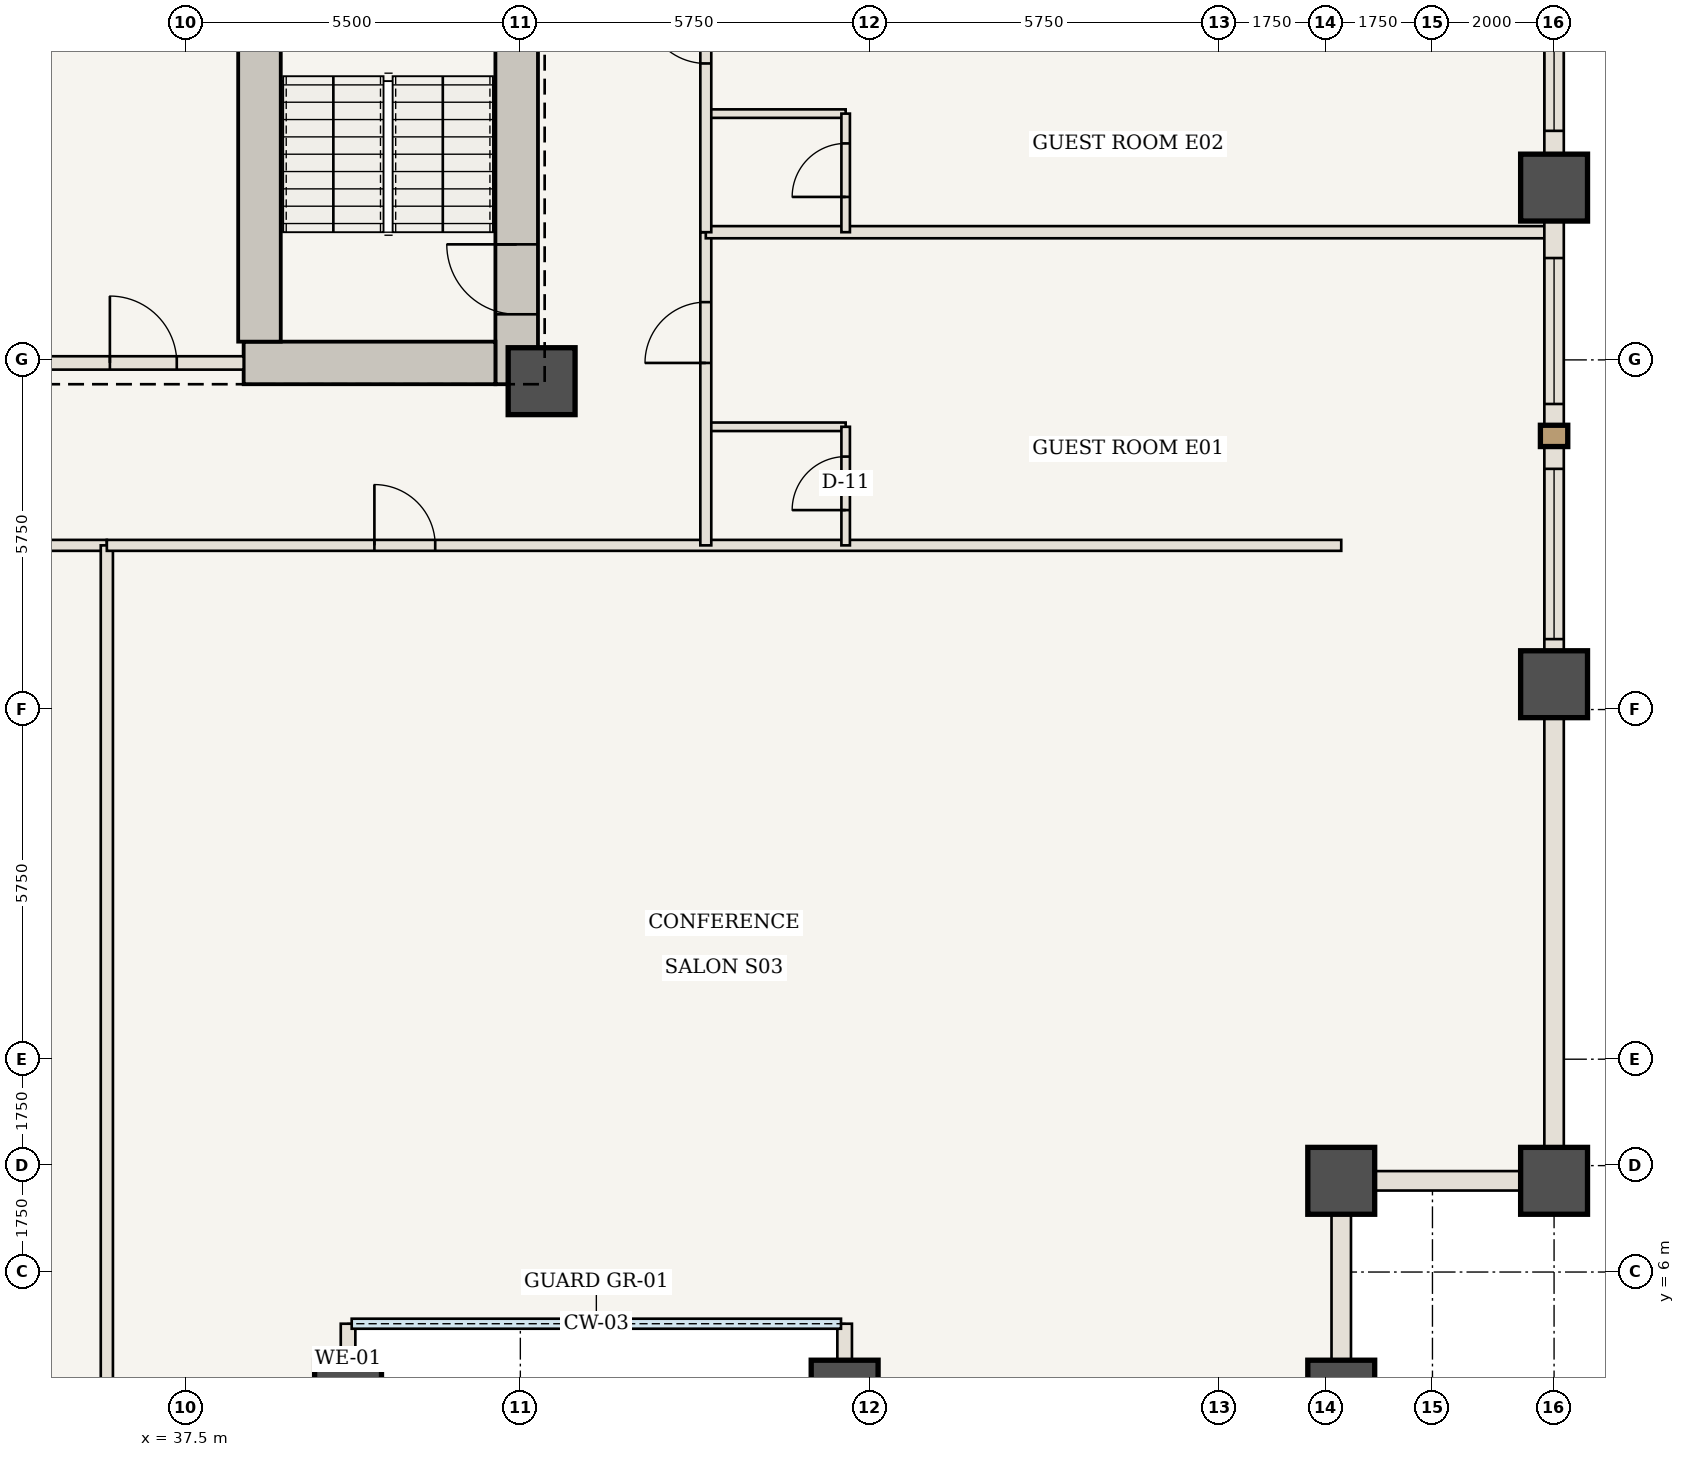
"""IFC4 building model, lengths in metres.
Left out: names, types, materials, properties, quantities, classifications, styles, units other than length and angle.
Written with IfcOpenShell. Run it as: python <this file> out.ifc"""

import sys

from ifc_helpers import new_model, si_unit, direction, frame, frame_2d, origin, origin_2d, place, context, subcontext, project, spatial, rectangle, extrude, element, fill, save


model = new_model("IFC4")
c1 = context("Model", 3, precision=1e-05, world=origin(), true_north=direction((0.0, 1.0)))
c2 = subcontext(c1, "Body", "Model", "MODEL_VIEW")
j1 = project(units=[si_unit("LENGTHUNIT", "METRE"), si_unit("PLANEANGLEUNIT", "RADIAN")], contexts=[c1])
p1 = place(None, origin())
s1 = spatial("IfcSite", under=j1, at=p1, CompositionType="ELEMENT")
p2 = place(p1, origin())
s2 = spatial("IfcBuilding", under=s1, at=p2, CompositionType="ELEMENT")
p3 = place(p2, frame((0.0, 0.0, 66.85)))
s3 = spatial("IfcBuildingStorey", under=s2, at=p3, CompositionType="ELEMENT", Elevation=66.85)
p4 = place(p3, frame((42.94, 20.6, 0.0), z_axis=(0.0, 0.0, 1.0), x_axis=(0.0, 1.0, 0.0)))
e1 = element("IfcWall", 1, at=p4, inside=s3, PredefinedType="SHEAR", context=c2, shape_type="SweptSolid", body=[
    extrude(rectangle(XDim=10.0, YDim=0.7, at=frame_2d((5.0, 0.0))), origin(), (0.0, 0.0, 1.0), 3.5),
])
p5 = place(p4, frame((1.15, 0.0, 0.0)))
e2 = element("IfcOpeningElement", 2, at=p5, cuts=e1, PredefinedType="OPENING", context=c2, shape_type="SweptSolid", body=[
    extrude(rectangle(XDim=1.15, YDim=2.15, at=frame_2d((0.575, 1.075))), frame((0.0, 0.36, 0.0), z_axis=(0.0, -1.0, 0.0), x_axis=(1.0, 0.0, 0.0)), (0.0, 0.0, 1.0), 0.72),
])
p6 = place(p3, frame((38.45, 20.95, 0.0), z_axis=(0.0, 0.0, 1.0), x_axis=(1.0, 0.0, 0.0)))
e3 = element("IfcWall", 3, at=p6, inside=s3, PredefinedType="SHEAR", context=c2, shape_type="SweptSolid", body=[
    extrude(rectangle(XDim=4.14, YDim=0.7, at=frame_2d((2.07, 0.0))), origin(), (0.0, 0.0, 1.0), 3.5),
])
p7 = place(p3, frame((38.71, 21.3, 0.0), z_axis=(0.0, 0.0, 1.0), x_axis=(0.0, 1.0, 0.0)))
e4 = element("IfcWall", 4, at=p7, inside=s3, PredefinedType="SHEAR", context=c2, shape_type="SweptSolid", body=[
    extrude(rectangle(XDim=9.3, YDim=0.7, at=frame_2d((4.65, 0.0))), origin(), (0.0, 0.0, 1.0), 3.5),
])
for number, where, z_axis, x_axis in (
    (5, (43.35, 20.65, 0.0), (0.0, 0.0, 1.0), (1.0, 0.0, 0.0)),
    (6, (56.5, 4.0, 0.0), (0.0, 0.0, 1.0), (1.0, 0.0, 0.0)),
    (7, (56.5, 7.5, 0.0), (0.0, 0.0, 1.0), (1.0, 0.0, 0.0)),
    (8, (60.0, 7.5, 0.0), (0.0, 0.0, 1.0), (1.0, 0.0, 0.0)),
    (9, (60.0, 15.667, 0.0), (0.0, 0.0, 1.0), (1.0, 0.0, 0.0)),
    (10, (60.0, 23.833, 0.0), (0.0, 0.0, 1.0), (1.0, 0.0, 0.0)),
    (11, (40.167, 4.0, 0.0), (0.0, 0.0, 1.0), (1.0, 0.0, 0.0)),
    (12, (48.333, 4.0, 0.0), (0.0, 0.0, 1.0), (1.0, 0.0, 0.0)),
):
    element("IfcColumn", number, at=place(p3, frame(where, z_axis=z_axis, x_axis=x_axis)), inside=s3, PredefinedType="COLUMN", context=c2, shape_type="SweptSolid", body=[
        extrude(rectangle(XDim=1.1, YDim=1.1, at=origin_2d()), origin(), (0.0, 0.0, 1.0), 3.5),
    ])
p8 = place(p3, frame((35.15, 20.95, 0.0), z_axis=(0.0, 0.0, 1.0), x_axis=(1.0, 0.0, 0.0)))
e13 = element("IfcWall", 13, at=p8, inside=s3, PredefinedType="STANDARD", context=c2, shape_type="SweptSolid", body=[
    extrude(rectangle(XDim=3.3, YDim=0.22, at=frame_2d((1.65, 0.0))), origin(), (0.0, 0.0, 1.0), 3.32),
])
p9 = place(p8, frame((1.1, 0.0, 0.0)))
e14 = element("IfcOpeningElement", 14, at=p9, cuts=e13, PredefinedType="OPENING", context=c2, shape_type="SweptSolid", body=[
    extrude(rectangle(XDim=1.1, YDim=2.15, at=frame_2d((0.55, 1.075))), frame((0.0, 0.12, 0.0), z_axis=(0.0, -1.0, 0.0), x_axis=(1.0, 0.0, 0.0)), (0.0, 0.0, 1.0), 0.24),
])
p10 = place(p3, frame((21.8, 17.95, 0.0), z_axis=(0.0, 0.0, 1.0), x_axis=(1.0, 0.0, 0.0)))
e15 = element("IfcWall", 15, at=p10, inside=s3, PredefinedType="STANDARD", context=c2, shape_type="SweptSolid", body=[
    extrude(rectangle(XDim=14.4, YDim=0.18, at=frame_2d((7.2, 0.0))), origin(), (0.0, 0.0, 1.0), 3.32),
])
p11 = place(p10, frame((8.15, 0.0, 0.0)))
e16 = element("IfcOpeningElement", 16, at=p11, cuts=e15, PredefinedType="OPENING", context=c2, shape_type="SweptSolid", body=[
    extrude(rectangle(XDim=1.0, YDim=2.15, at=frame_2d((0.5, 1.075))), frame((0.0, 0.1, 0.0), z_axis=(0.0, -1.0, 0.0), x_axis=(1.0, 0.0, 0.0)), (0.0, 0.0, 1.0), 0.2),
])
p12 = place(p3, frame((36.2, 4.06, 0.0), z_axis=(0.0, 0.0, 1.0), x_axis=(0.0, 1.0, 0.0)))
e17 = element("IfcWall", 17, at=p12, inside=s3, PredefinedType="STANDARD", context=c2, shape_type="SweptSolid", body=[
    extrude(rectangle(XDim=13.89, YDim=0.2, at=frame_2d((6.945, 0.0))), origin(), (0.0, 0.0, 1.0), 3.32),
])
p13 = place(p3, frame((36.2, 17.95, 0.0), z_axis=(0.0, 0.0, 1.0), x_axis=(1.0, 0.0, 0.0)))
e18 = element("IfcWall", 18, at=p13, inside=s3, PredefinedType="STANDARD", context=c2, shape_type="SweptSolid", body=[
    extrude(rectangle(XDim=20.3, YDim=0.18, at=frame_2d((10.15, 0.0))), origin(), (0.0, 0.0, 1.0), 3.32),
])
p14 = place(p13, frame((4.4, 0.0, 0.0)))
e19 = element("IfcOpeningElement", 19, at=p14, cuts=e18, PredefinedType="OPENING", context=c2, shape_type="SweptSolid", body=[
    extrude(rectangle(XDim=1.0, YDim=2.15, at=frame_2d((0.5, 1.075))), frame((0.0, 0.1, 0.0), z_axis=(0.0, -1.0, 0.0), x_axis=(1.0, 0.0, 0.0)), (0.0, 0.0, 1.0), 0.2),
])
p15 = place(p3, frame((46.05, 19.9, 0.0), z_axis=(0.0, 0.0, 1.0), x_axis=(1.0, 0.0, 0.0)))
e20 = element("IfcWall", 20, at=p15, inside=s3, PredefinedType="STANDARD", context=c2, shape_type="SweptSolid", body=[
    extrude(rectangle(XDim=2.3, YDim=0.14, at=frame_2d((1.15, 0.0))), origin(), (0.0, 0.0, 1.0), 3.32),
])
p16 = place(p3, frame((48.35, 17.95, 0.0), z_axis=(0.0, 0.0, 1.0), x_axis=(0.0, 1.0, 0.0)))
e21 = element("IfcWall", 21, at=p16, inside=s3, PredefinedType="STANDARD", context=c2, shape_type="SweptSolid", body=[
    extrude(rectangle(XDim=1.95, YDim=0.14, at=frame_2d((0.975, 0.0))), origin(), (0.0, 0.0, 1.0), 3.32),
])
p17 = place(p16, frame((0.58, 0.0, 0.0)))
e22 = element("IfcOpeningElement", 22, at=p17, cuts=e21, PredefinedType="OPENING", context=c2, shape_type="SweptSolid", body=[
    extrude(rectangle(XDim=0.88, YDim=2.1, at=frame_2d((0.44, 1.05))), frame((0.0, 0.08, 0.0), z_axis=(0.0, -1.0, 0.0), x_axis=(1.0, 0.0, 0.0)), (0.0, 0.0, 1.0), 0.16),
])
p18 = place(p3, frame((46.05, 17.95, 0.0), z_axis=(0.0, 0.0, 1.0), x_axis=(0.0, 1.0, 0.0)))
e23 = element("IfcWall", 23, at=p18, inside=s3, PredefinedType="STANDARD", context=c2, shape_type="SweptSolid", body=[
    extrude(rectangle(XDim=5.15, YDim=0.18, at=frame_2d((2.575, 0.0))), origin(), (0.0, 0.0, 1.0), 3.32),
])
p19 = place(p18, frame((3.0, 0.0, 0.0)))
e24 = element("IfcOpeningElement", 24, at=p19, cuts=e23, PredefinedType="OPENING", context=c2, shape_type="SweptSolid", body=[
    extrude(rectangle(XDim=1.0, YDim=2.15, at=frame_2d((0.5, 1.075))), frame((0.0, 0.1, 0.0), z_axis=(0.0, -1.0, 0.0), x_axis=(1.0, 0.0, 0.0)), (0.0, 0.0, 1.0), 0.2),
])
p20 = place(p3, frame((46.05, 23.1, 0.0), z_axis=(0.0, 0.0, 1.0), x_axis=(1.0, 0.0, 0.0)))
e25 = element("IfcWall", 25, at=p20, inside=s3, PredefinedType="STANDARD", context=c2, shape_type="SweptSolid", body=[
    extrude(rectangle(XDim=13.89, YDim=0.2, at=frame_2d((6.945, 0.0))), origin(), (0.0, 0.0, 1.0), 3.32),
])
p21 = place(p3, frame((46.05, 25.05, 0.0), z_axis=(0.0, 0.0, 1.0), x_axis=(1.0, 0.0, 0.0)))
e26 = element("IfcWall", 26, at=p21, inside=s3, PredefinedType="STANDARD", context=c2, shape_type="SweptSolid", body=[
    extrude(rectangle(XDim=2.3, YDim=0.14, at=frame_2d((1.15, 0.0))), origin(), (0.0, 0.0, 1.0), 3.32),
])
p22 = place(p3, frame((48.35, 23.1, 0.0), z_axis=(0.0, 0.0, 1.0), x_axis=(0.0, 1.0, 0.0)))
e27 = element("IfcWall", 27, at=p22, inside=s3, PredefinedType="STANDARD", context=c2, shape_type="SweptSolid", body=[
    extrude(rectangle(XDim=1.95, YDim=0.14, at=frame_2d((0.975, 0.0))), origin(), (0.0, 0.0, 1.0), 3.32),
])
p23 = place(p22, frame((0.58, 0.0, 0.0)))
e28 = element("IfcOpeningElement", 28, at=p23, cuts=e27, PredefinedType="OPENING", context=c2, shape_type="SweptSolid", body=[
    extrude(rectangle(XDim=0.88, YDim=2.1, at=frame_2d((0.44, 1.05))), frame((0.0, 0.08, 0.0), z_axis=(0.0, -1.0, 0.0), x_axis=(1.0, 0.0, 0.0)), (0.0, 0.0, 1.0), 0.16),
])
p24 = place(p3, frame((46.05, 23.1, 0.0), z_axis=(0.0, 0.0, 1.0), x_axis=(0.0, 1.0, 0.0)))
e29 = element("IfcWall", 29, at=p24, inside=s3, PredefinedType="STANDARD", context=c2, shape_type="SweptSolid", body=[
    extrude(rectangle(XDim=4.7, YDim=0.18, at=frame_2d((2.35, 0.0))), origin(), (0.0, 0.0, 1.0), 3.32),
])
p25 = place(p24, frame((2.775, 0.0, 0.0)))
e30 = element("IfcOpeningElement", 30, at=p25, cuts=e29, PredefinedType="OPENING", context=c2, shape_type="SweptSolid", body=[
    extrude(rectangle(XDim=1.0, YDim=2.15, at=frame_2d((0.5, 1.075))), frame((0.0, 0.1, 0.0), z_axis=(0.0, -1.0, 0.0), x_axis=(1.0, 0.0, 0.0)), (0.0, 0.0, 1.0), 0.2),
])
for number, where, z_axis, x_axis in (
    (31, (40.167, 4.0, 0.0), (0.0, 0.0, 1.0), (0.0, 1.0, 0.0)),
    (32, (48.333, 4.0, 0.0), (0.0, 0.0, 1.0), (0.0, 1.0, 0.0)),
):
    element("IfcWall", number, at=place(p3, frame(where, z_axis=z_axis, x_axis=x_axis)), inside=s3, PredefinedType="USERDEFINED", context=c2, shape_type="SweptSolid", body=[
        extrude(rectangle(XDim=1.15, YDim=0.24, at=frame_2d((0.575, 0.0))), origin(), (0.0, 0.0, 1.0), 2.52),
    ])
p26 = place(p3, frame((60.0, 15.667, 0.0), z_axis=(0.0, 0.0, 1.0), x_axis=(0.0, -1.0, 0.0)))
e33 = element("IfcWall", 33, at=p26, inside=s3, PredefinedType="USERDEFINED", context=c2, shape_type="SweptSolid", body=[
    extrude(rectangle(XDim=8.167, YDim=0.32, at=frame_2d((4.083, 0.0))), origin(), (0.0, 0.0, 1.0), 2.52),
])
p27 = place(p3, frame((60.0, 23.833, 0.0), z_axis=(0.0, 0.0, 1.0), x_axis=(0.0, -1.0, 0.0)))
e34 = element("IfcWall", 34, at=p27, inside=s3, PredefinedType="USERDEFINED", context=c2, shape_type="SweptSolid", body=[
    extrude(rectangle(XDim=8.167, YDim=0.32, at=frame_2d((4.083, 0.0))), origin(), (0.0, 0.0, 1.0), 2.52),
])
p28 = place(p27, frame((1.158, 0.0, 0.85)))
e35 = element("IfcOpeningElement", 35, at=p28, cuts=e34, PredefinedType="OPENING", context=c2, shape_type="SweptSolid", body=[
    extrude(rectangle(XDim=2.4, YDim=1.47, at=frame_2d((1.2, 0.735))), frame((0.0, 0.17, 0.0), z_axis=(0.0, -1.0, 0.0), x_axis=(1.0, 0.0, 0.0)), (0.0, 0.0, 1.0), 0.34),
])
p29 = place(p27, frame((4.625, 0.0, 0.85)))
e36 = element("IfcOpeningElement", 36, at=p29, cuts=e34, PredefinedType="OPENING", context=c2, shape_type="SweptSolid", body=[
    extrude(rectangle(XDim=2.8, YDim=1.47, at=frame_2d((1.4, 0.735))), frame((0.0, 0.17, 0.0), z_axis=(0.0, -1.0, 0.0), x_axis=(1.0, 0.0, 0.0)), (0.0, 0.0, 1.0), 0.34),
])
p30 = place(p3, frame((60.0, 32.0, 0.0), z_axis=(0.0, 0.0, 1.0), x_axis=(0.0, -1.0, 0.0)))
e37 = element("IfcWall", 37, at=p30, inside=s3, PredefinedType="USERDEFINED", context=c2, shape_type="SweptSolid", body=[
    extrude(rectangle(XDim=8.167, YDim=0.32, at=frame_2d((4.083, 0.0))), origin(), (0.0, 0.0, 1.0), 2.52),
])
p31 = place(p30, frame((1.05, 0.0, 0.85)))
e38 = element("IfcOpeningElement", 38, at=p31, cuts=e37, PredefinedType="OPENING", context=c2, shape_type="SweptSolid", body=[
    extrude(rectangle(XDim=2.4, YDim=1.47, at=frame_2d((1.2, 0.735))), frame((0.0, 0.17, 0.0), z_axis=(0.0, -1.0, 0.0), x_axis=(1.0, 0.0, 0.0)), (0.0, 0.0, 1.0), 0.34),
])
p32 = place(p30, frame((4.833, 0.0, 0.85)))
e39 = element("IfcOpeningElement", 39, at=p32, cuts=e37, PredefinedType="OPENING", context=c2, shape_type="SweptSolid", body=[
    extrude(rectangle(XDim=2.4, YDim=1.47, at=frame_2d((1.2, 0.735))), frame((0.0, 0.17, 0.0), z_axis=(0.0, -1.0, 0.0), x_axis=(1.0, 0.0, 0.0)), (0.0, 0.0, 1.0), 0.34),
])
for number, where, z_axis, x_axis in (
    (40, (56.5, 7.5, 0.0), (0.0, 0.0, 1.0), (0.0, -1.0, 0.0)),
    (41, (60.0, 7.5, 0.0), (0.0, 0.0, 1.0), (-1.0, 0.0, 0.0)),
):
    element("IfcWall", number, at=place(p3, frame(where, z_axis=z_axis, x_axis=x_axis)), inside=s3, PredefinedType="USERDEFINED", context=c2, shape_type="SweptSolid", body=[
        extrude(rectangle(XDim=3.5, YDim=0.32, at=frame_2d((1.75, 0.0))), origin(), (0.0, 0.0, 1.0), 2.52),
    ])
p33 = place(p5, origin())
e42 = element("IfcDoor", 42, at=p33, inside=s3, OperationType="SINGLE_SWING_RIGHT", PredefinedType="DOOR", context=c2, shape_type="SweptSolid", body=[
    extrude(rectangle(XDim=1.15, YDim=2.15, at=frame_2d((0.575, 1.075))), frame((0.0, 0.025, 0.0), z_axis=(0.0, -1.0, 0.0), x_axis=(1.0, 0.0, 0.0)), (0.0, 0.0, 1.0), 0.05),
])
fill(e2, e42)
p34 = place(p9, origin())
e43 = element("IfcDoor", 43, at=p34, inside=s3, OperationType="SINGLE_SWING_LEFT", PredefinedType="DOOR", context=c2, shape_type="SweptSolid", body=[
    extrude(rectangle(XDim=1.1, YDim=2.15, at=frame_2d((0.55, 1.075))), frame((0.0, 0.025, 0.0), z_axis=(0.0, -1.0, 0.0), x_axis=(1.0, 0.0, 0.0)), (0.0, 0.0, 1.0), 0.05),
])
fill(e14, e43)
p35 = place(p14, origin())
e44 = element("IfcDoor", 44, at=p35, inside=s3, OperationType="SINGLE_SWING_LEFT", PredefinedType="DOOR", context=c2, shape_type="SweptSolid", body=[
    extrude(rectangle(XDim=1.0, YDim=2.15, at=frame_2d((0.5, 1.075))), frame((0.0, 0.025, 0.0), z_axis=(0.0, -1.0, 0.0), x_axis=(1.0, 0.0, 0.0)), (0.0, 0.0, 1.0), 0.05),
])
fill(e19, e44)
p36 = place(p17, origin())
e45 = element("IfcDoor", 45, at=p36, inside=s3, OperationType="SINGLE_SWING_LEFT", PredefinedType="DOOR", context=c2, shape_type="SweptSolid", body=[
    extrude(rectangle(XDim=0.88, YDim=2.1, at=frame_2d((0.44, 1.05))), frame((0.0, 0.025, 0.0), z_axis=(0.0, -1.0, 0.0), x_axis=(1.0, 0.0, 0.0)), (0.0, 0.0, 1.0), 0.05),
])
fill(e22, e45)
p37 = place(p19, origin())
e46 = element("IfcDoor", 46, at=p37, inside=s3, OperationType="SINGLE_SWING_LEFT", PredefinedType="DOOR", context=c2, shape_type="SweptSolid", body=[
    extrude(rectangle(XDim=1.0, YDim=2.15, at=frame_2d((0.5, 1.075))), frame((0.0, 0.025, 0.0), z_axis=(0.0, -1.0, 0.0), x_axis=(1.0, 0.0, 0.0)), (0.0, 0.0, 1.0), 0.05),
])
fill(e24, e46)
p38 = place(p23, origin())
e47 = element("IfcDoor", 47, at=p38, inside=s3, OperationType="SINGLE_SWING_LEFT", PredefinedType="DOOR", context=c2, shape_type="SweptSolid", body=[
    extrude(rectangle(XDim=0.88, YDim=2.1, at=frame_2d((0.44, 1.05))), frame((0.0, 0.025, 0.0), z_axis=(0.0, -1.0, 0.0), x_axis=(1.0, 0.0, 0.0)), (0.0, 0.0, 1.0), 0.05),
])
fill(e28, e47)
p39 = place(p25, origin())
e48 = element("IfcDoor", 48, at=p39, inside=s3, OperationType="SINGLE_SWING_RIGHT", PredefinedType="DOOR", context=c2, shape_type="SweptSolid", body=[
    extrude(rectangle(XDim=1.0, YDim=2.15, at=frame_2d((0.5, 1.075))), frame((0.0, 0.025, 0.0), z_axis=(0.0, -1.0, 0.0), x_axis=(1.0, 0.0, 0.0)), (0.0, 0.0, 1.0), 0.05),
])
fill(e30, e48)
p40 = place(p28, origin())
e49 = element("IfcWindow", 49, at=p40, inside=s3, PartitioningType="SINGLE_PANEL", PredefinedType="WINDOW", context=c2, shape_type="SweptSolid", body=[
    extrude(rectangle(XDim=2.4, YDim=1.47, at=frame_2d((1.2, 0.735))), frame((0.0, 0.03, 0.0), z_axis=(0.0, -1.0, 0.0), x_axis=(1.0, 0.0, 0.0)), (0.0, 0.0, 1.0), 0.06),
])
fill(e35, e49)
p41 = place(p29, origin())
e50 = element("IfcWindow", 50, at=p41, inside=s3, PartitioningType="SINGLE_PANEL", PredefinedType="WINDOW", context=c2, shape_type="SweptSolid", body=[
    extrude(rectangle(XDim=2.8, YDim=1.47, at=frame_2d((1.4, 0.735))), frame((0.0, 0.03, 0.0), z_axis=(0.0, -1.0, 0.0), x_axis=(1.0, 0.0, 0.0)), (0.0, 0.0, 1.0), 0.06),
])
fill(e36, e50)
p42 = place(p32, origin())
e51 = element("IfcWindow", 51, at=p42, inside=s3, PartitioningType="SINGLE_PANEL", PredefinedType="WINDOW", context=c2, shape_type="SweptSolid", body=[
    extrude(rectangle(XDim=2.4, YDim=1.47, at=frame_2d((1.2, 0.735))), frame((0.0, 0.03, 0.0), z_axis=(0.0, -1.0, 0.0), x_axis=(1.0, 0.0, 0.0)), (0.0, 0.0, 1.0), 0.06),
])
fill(e39, e51)
save(model, sys.argv[1])
